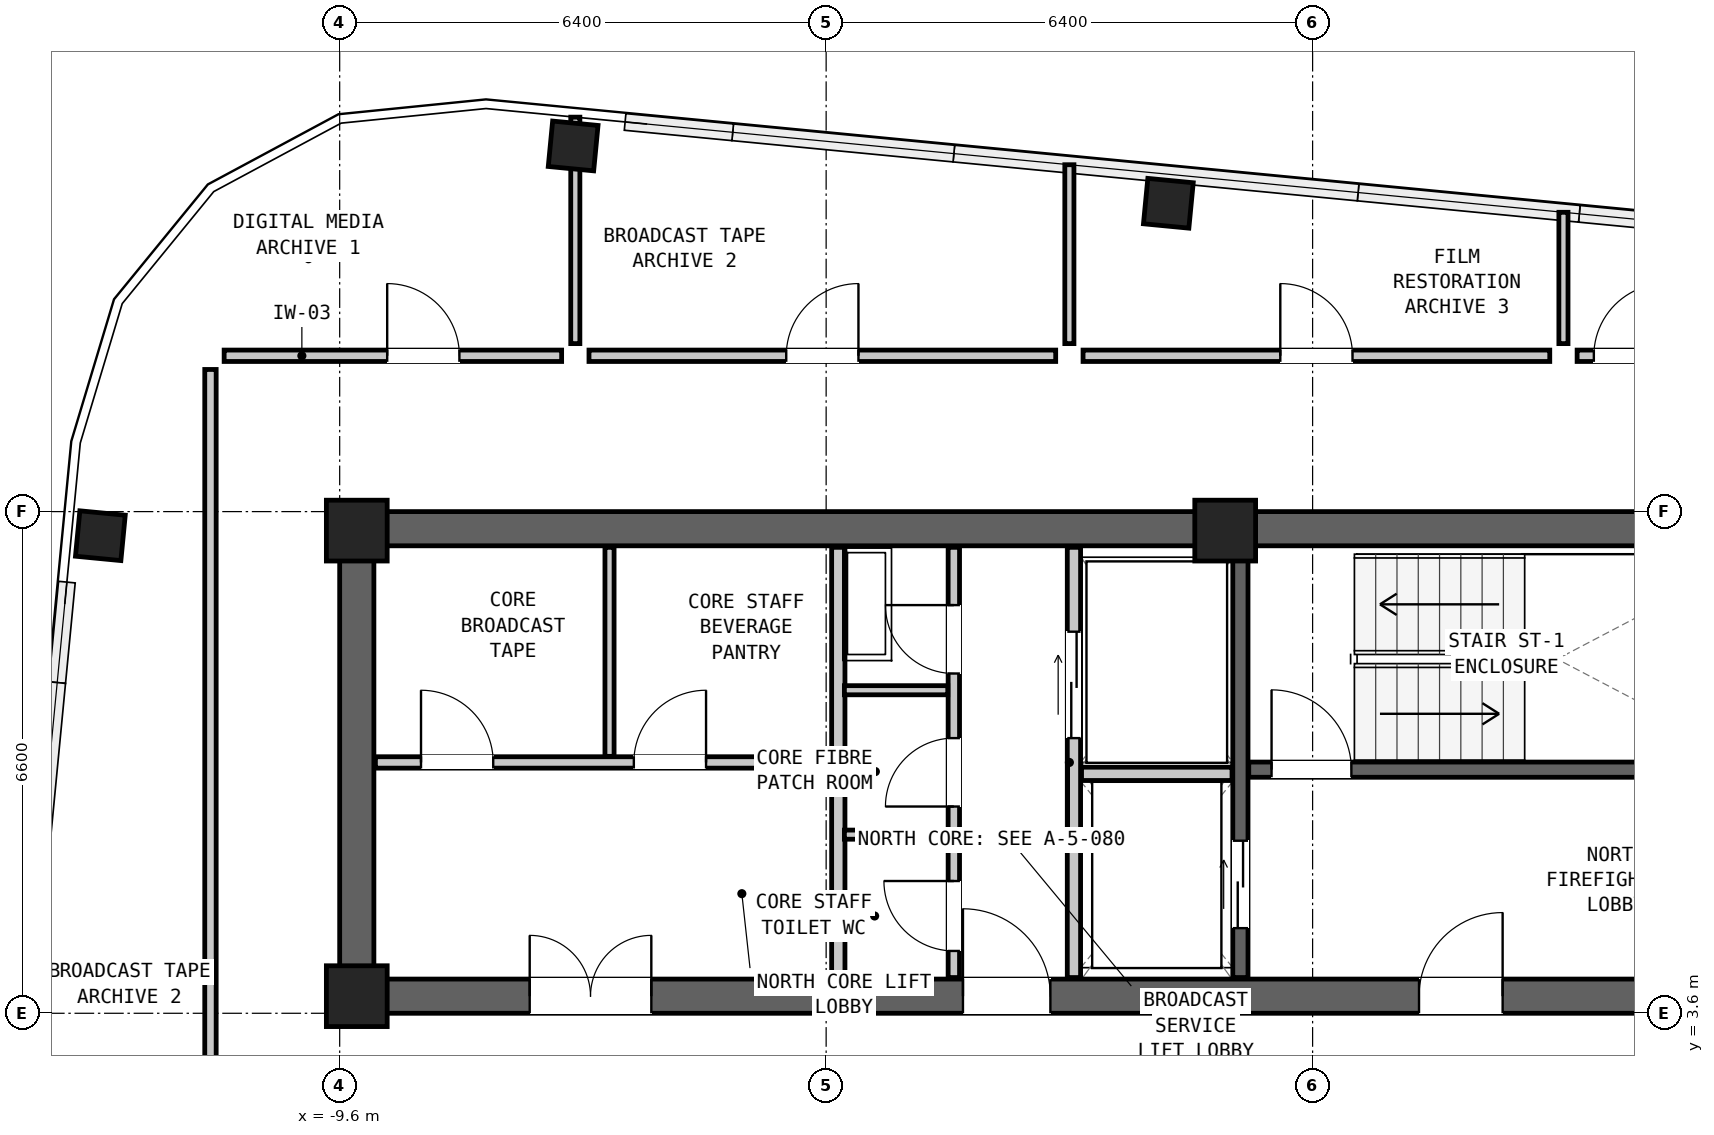
"""IFC4 building model, lengths in metres.
Left out: names, types, materials, properties, quantities, classifications, styles, units other than length and angle.
Written with IfcOpenShell. Run it as: python <this file> out.ifc"""

import sys

from ifc_helpers import new_model, si_unit, direction, frame, frame_2d, origin, origin_2d, place, context, subcontext, project, spatial, rectangle, hollow_rectangle, extrude, element, fill, save


model = new_model("IFC4")
c1 = context("Model", 3, precision=1e-05, world=origin(), true_north=direction((0.0, 1.0)))
c2 = subcontext(c1, "Body", "Model", "MODEL_VIEW")
j1 = project(units=[si_unit("LENGTHUNIT", "METRE"), si_unit("PLANEANGLEUNIT", "RADIAN")], contexts=[c1])
p1 = place(None, origin())
s1 = spatial("IfcSite", under=j1, at=p1, CompositionType="ELEMENT")
p2 = place(p1, origin())
s2 = spatial("IfcBuilding", under=s1, at=p2, CompositionType="ELEMENT")
p3 = place(p2, frame((0.0, 0.0, 261.15)))
s3 = spatial("IfcBuildingStorey", under=s2, at=p3, CompositionType="ELEMENT", Elevation=261.15)
p4 = place(p3, frame((-9.6, 9.975, 0.0), z_axis=(0.0, 0.0, 1.0), x_axis=(1.0, 0.0, 0.0)))
e1 = element("IfcWall", 1, at=p4, inside=s3, PredefinedType="SHEAR", context=c2, shape_type="SweptSolid", body=[
    extrude(rectangle(XDim=19.2, YDim=0.45, at=frame_2d((9.6, 0.0))), origin(), (0.0, 0.0, 1.0), 3.05),
])
p5 = place(p3, frame((-9.6, 3.825, 0.0), z_axis=(0.0, 0.0, 1.0), x_axis=(1.0, 0.0, 0.0)))
e2 = element("IfcWall", 2, at=p5, inside=s3, PredefinedType="SHEAR", context=c2, shape_type="SweptSolid", body=[
    extrude(rectangle(XDim=19.2, YDim=0.45, at=frame_2d((9.6, 0.0))), origin(), (0.0, 0.0, 1.0), 3.05),
])
p6 = place(p5, frame((14.2, 0.0, 0.0)))
e3 = element("IfcOpeningElement", 3, at=p6, cuts=e2, PredefinedType="OPENING", context=c2, shape_type="SweptSolid", body=[
    extrude(rectangle(XDim=1.1, YDim=2.08, at=frame_2d((0.55, 1.04))), frame((0.0, 0.237, 0.0), z_axis=(0.0, -1.0, 0.0), x_axis=(1.0, 0.0, 0.0)), (0.0, 0.0, 1.0), 0.474),
])
p7 = place(p5, frame((8.2, 0.0, 0.0)))
e4 = element("IfcOpeningElement", 4, at=p7, cuts=e2, PredefinedType="OPENING", context=c2, shape_type="SweptSolid", body=[
    extrude(rectangle(XDim=1.15, YDim=2.1, at=frame_2d((0.575, 1.05))), frame((0.0, 0.237, 0.0), z_axis=(0.0, -1.0, 0.0), x_axis=(1.0, 0.0, 0.0)), (0.0, 0.0, 1.0), 0.474),
])
p8 = place(p5, frame((2.5, 0.0, 0.0)))
e5 = element("IfcOpeningElement", 5, at=p8, cuts=e2, PredefinedType="OPENING", context=c2, shape_type="SweptSolid", body=[
    extrude(rectangle(XDim=1.6, YDim=2.12, at=frame_2d((0.8, 1.06))), frame((0.0, 0.237, 0.0), z_axis=(0.0, -1.0, 0.0), x_axis=(1.0, 0.0, 0.0)), (0.0, 0.0, 1.0), 0.474),
])
p9 = place(p3, frame((-9.375, 3.6, 0.0), z_axis=(0.0, 0.0, 1.0), x_axis=(0.0, 1.0, 0.0)))
e6 = element("IfcWall", 6, at=p9, inside=s3, PredefinedType="SHEAR", context=c2, shape_type="SweptSolid", body=[
    extrude(rectangle(XDim=6.6, YDim=0.45, at=frame_2d((3.3, 0.0))), origin(), (0.0, 0.0, 1.0), 3.05),
])
for number, where, z_axis, x_axis in (
    (7, (1.302, 14.256, 0.0), (0.0, 0.0, 1.0), (0.995, -0.096, 0.0)),
    (8, (-6.528, 15.01, 0.0), (0.0, 0.0, 1.0), (0.995, -0.096, 0.0)),
    (9, (-12.749, 9.883, 0.0), (0.0, 0.0, 1.0), (0.096, 0.995, 0.0)),
):
    element("IfcColumn", number, at=place(p3, frame(where, z_axis=z_axis, x_axis=x_axis)), inside=s3, PredefinedType="COLUMN", context=c2, shape_type="SweptSolid", body=[
        extrude(hollow_rectangle(XDim=0.6, YDim=0.6, WallThickness=0.04, at=origin_2d()), origin(), (0.0, 0.0, 1.0), 3.05),
    ])
for number, where, z_axis, x_axis in (
    (10, (-9.375, 9.95, 0.0), (0.0, 0.0, 1.0), (1.0, 0.0, 0.0)),
    (11, (2.05, 9.95, 0.0), (0.0, 0.0, 1.0), (1.0, 0.0, 0.0)),
    (12, (-9.375, 3.825, 0.0), (0.0, 0.0, 1.0), (1.0, 0.0, 0.0)),
):
    element("IfcColumn", number, at=place(p3, frame(where, z_axis=z_axis, x_axis=x_axis)), inside=s3, PredefinedType="COLUMN", context=c2, shape_type="SweptSolid", body=[
        extrude(rectangle(XDim=0.8, YDim=0.8, at=origin_2d()), origin(), (0.0, 0.0, 1.0), 3.05),
    ])
p10 = place(p3, frame((2.36, 6.805, 0.0), z_axis=(0.0, 0.0, 1.0), x_axis=(1.0, 0.0, 0.0)))
e13 = element("IfcWall", 13, at=p10, inside=s3, PredefinedType="SHEAR", context=c2, shape_type="SweptSolid", body=[
    extrude(rectangle(XDim=6.77, YDim=0.2, at=frame_2d((3.385, 0.0))), origin(), (0.0, 0.0, 1.0), 2.86),
])
p11 = place(p10, frame((0.3, 0.0, 0.0)))
e14 = element("IfcOpeningElement", 14, at=p11, cuts=e13, PredefinedType="OPENING", context=c2, shape_type="SweptSolid", body=[
    extrude(rectangle(XDim=1.05, YDim=2.08, at=frame_2d((0.525, 1.04))), frame((0.0, 0.112, 0.0), z_axis=(0.0, -1.0, 0.0), x_axis=(1.0, 0.0, 0.0)), (0.0, 0.0, 1.0), 0.224),
])
p12 = place(p3, frame((2.25, 4.07, 0.0), z_axis=(0.0, 0.0, 1.0), x_axis=(0.0, 1.0, 0.0)))
e15 = element("IfcWall", 15, at=p12, inside=s3, PredefinedType="SHEAR", context=c2, shape_type="SweptSolid", body=[
    extrude(rectangle(XDim=5.66, YDim=0.2, at=frame_2d((2.83, 0.0))), origin(), (0.0, 0.0, 1.0), 2.86),
])
p13 = place(p12, frame((0.65, 0.0, 0.0)))
e16 = element("IfcOpeningElement", 16, at=p13, cuts=e15, PredefinedType="OPENING", context=c2, shape_type="SweptSolid", body=[
    extrude(rectangle(XDim=1.15, YDim=2.08, at=frame_2d((0.575, 1.04))), frame((0.0, 0.112, 0.0), z_axis=(0.0, -1.0, 0.0), x_axis=(1.0, 0.0, 0.0)), (0.0, 0.0, 1.0), 0.224),
])
p14 = place(p3, frame((0.06, 4.07, 0.0), z_axis=(0.0, 0.0, 1.0), x_axis=(0.0, 1.0, 0.0)))
e17 = element("IfcWall", 17, at=p14, inside=s3, PredefinedType="PARTITIONING", context=c2, shape_type="SweptSolid", body=[
    extrude(rectangle(XDim=5.66, YDim=0.175, at=frame_2d((2.83, 0.0))), origin(), (0.0, 0.0, 1.0), 2.86),
])
p15 = place(p14, frame((3.15, 0.0, 0.0)))
e18 = element("IfcOpeningElement", 18, at=p15, cuts=e17, PredefinedType="OPENING", context=c2, shape_type="SweptSolid", body=[
    extrude(rectangle(XDim=1.4, YDim=2.12, at=frame_2d((0.7, 1.06))), frame((0.0, 0.1, 0.0), z_axis=(0.0, -1.0, 0.0), x_axis=(1.0, 0.0, 0.0)), (0.0, 0.0, 1.0), 0.199),
])
p16 = place(p3, frame((0.16, 6.75, 0.0), z_axis=(0.0, 0.0, 1.0), x_axis=(1.0, 0.0, 0.0)))
e19 = element("IfcWall", 19, at=p16, inside=s3, PredefinedType="PARTITIONING", context=c2, shape_type="SweptSolid", body=[
    extrude(rectangle(XDim=1.98, YDim=0.175, at=frame_2d((0.99, 0.0))), origin(), (0.0, 0.0, 1.0), 2.86),
])
p17 = place(p3, frame((-3.04, 4.07, 0.0), z_axis=(0.0, 0.0, 1.0), x_axis=(0.0, 1.0, 0.0)))
e20 = element("IfcWall", 20, at=p17, inside=s3, PredefinedType="PARTITIONING", context=c2, shape_type="SweptSolid", body=[
    extrude(rectangle(XDim=5.66, YDim=0.175, at=frame_2d((2.83, 0.0))), origin(), (0.0, 0.0, 1.0), 2.86),
])
p18 = place(p3, frame((-1.52, 4.07, 0.0), z_axis=(0.0, 0.0, 1.0), x_axis=(0.0, 1.0, 0.0)))
e21 = element("IfcWall", 21, at=p18, inside=s3, PredefinedType="PARTITIONING", context=c2, shape_type="SweptSolid", body=[
    extrude(rectangle(XDim=5.66, YDim=0.15, at=frame_2d((2.83, 0.0))), origin(), (0.0, 0.0, 1.0), 2.86),
])
p19 = place(p18, frame((4.0, 0.0, 0.0)))
e22 = element("IfcOpeningElement", 22, at=p19, cuts=e21, PredefinedType="OPENING", context=c2, shape_type="SweptSolid", body=[
    extrude(rectangle(XDim=0.9, YDim=2.05, at=frame_2d((0.45, 1.025))), frame((0.0, 0.087, 0.0), z_axis=(0.0, -1.0, 0.0), x_axis=(1.0, 0.0, 0.0)), (0.0, 0.0, 1.0), 0.174),
])
p20 = place(p18, frame((2.25, 0.0, 0.0)))
e23 = element("IfcOpeningElement", 23, at=p20, cuts=e21, PredefinedType="OPENING", context=c2, shape_type="SweptSolid", body=[
    extrude(rectangle(XDim=0.9, YDim=2.05, at=frame_2d((0.45, 1.025))), frame((0.0, 0.087, 0.0), z_axis=(0.0, -1.0, 0.0), x_axis=(1.0, 0.0, 0.0)), (0.0, 0.0, 1.0), 0.174),
])
p21 = place(p18, frame((0.35, 0.0, 0.0)))
e24 = element("IfcOpeningElement", 24, at=p21, cuts=e21, PredefinedType="OPENING", context=c2, shape_type="SweptSolid", body=[
    extrude(rectangle(XDim=0.92, YDim=2.1, at=frame_2d((0.46, 1.05))), frame((0.0, 0.087, 0.0), z_axis=(0.0, -1.0, 0.0), x_axis=(1.0, 0.0, 0.0)), (0.0, 0.0, 1.0), 0.174),
])
for number, where, z_axis, x_axis in (
    (25, (-2.96, 5.95, 0.0), (0.0, 0.0, 1.0), (1.0, 0.0, 0.0)),
    (26, (-2.96, 7.85, 0.0), (0.0, 0.0, 1.0), (1.0, 0.0, 0.0)),
):
    element("IfcWall", number, at=place(p3, frame(where, z_axis=z_axis, x_axis=x_axis)), inside=s3, PredefinedType="PARTITIONING", context=c2, shape_type="SweptSolid", body=[
        extrude(rectangle(XDim=1.36, YDim=0.12, at=frame_2d((0.68, 0.0))), origin(), (0.0, 0.0, 1.0), 2.86),
    ])
p22 = place(p3, frame((-9.13, 6.9, 0.0), z_axis=(0.0, 0.0, 1.0), x_axis=(1.0, 0.0, 0.0)))
e27 = element("IfcWall", 27, at=p22, inside=s3, PredefinedType="PARTITIONING", context=c2, shape_type="SweptSolid", body=[
    extrude(rectangle(XDim=6.01, YDim=0.15, at=frame_2d((3.005, 0.0))), origin(), (0.0, 0.0, 1.0), 2.86),
])
p23 = place(p22, frame((0.6, 0.0, 0.0)))
e28 = element("IfcOpeningElement", 28, at=p23, cuts=e27, PredefinedType="OPENING", context=c2, shape_type="SweptSolid", body=[
    extrude(rectangle(XDim=0.95, YDim=2.1, at=frame_2d((0.475, 1.05))), frame((0.0, 0.087, 0.0), z_axis=(0.0, -1.0, 0.0), x_axis=(1.0, 0.0, 0.0)), (0.0, 0.0, 1.0), 0.174),
])
p24 = place(p22, frame((3.4, 0.0, 0.0)))
e29 = element("IfcOpeningElement", 29, at=p24, cuts=e27, PredefinedType="OPENING", context=c2, shape_type="SweptSolid", body=[
    extrude(rectangle(XDim=0.95, YDim=2.1, at=frame_2d((0.475, 1.05))), frame((0.0, 0.087, 0.0), z_axis=(0.0, -1.0, 0.0), x_axis=(1.0, 0.0, 0.0)), (0.0, 0.0, 1.0), 0.174),
])
p25 = place(p3, frame((-6.05, 6.98, 0.0), z_axis=(0.0, 0.0, 1.0), x_axis=(0.0, 1.0, 0.0)))
e30 = element("IfcWall", 30, at=p25, inside=s3, PredefinedType="PARTITIONING", context=c2, shape_type="SweptSolid", body=[
    extrude(rectangle(XDim=2.75, YDim=0.12, at=frame_2d((1.375, 0.0))), origin(), (0.0, 0.0, 1.0), 2.86),
])
p26 = place(p3, frame((-6.5, 12.41, 0.0), z_axis=(0.0, 0.0, 1.0), x_axis=(0.0, 1.0, 0.0)))
e31 = element("IfcWall", 31, at=p26, inside=s3, PredefinedType="PARTITIONING", context=c2, shape_type="SweptSolid", body=[
    extrude(rectangle(XDim=2.979, YDim=0.12, at=frame_2d((1.49, 0.0))), origin(), (0.0, 0.0, 1.0), 2.381),
])
p27 = place(p3, frame((0.0, 12.41, 0.0), z_axis=(0.0, 0.0, 1.0), x_axis=(0.0, 1.0, 0.0)))
e32 = element("IfcWall", 32, at=p27, inside=s3, PredefinedType="PARTITIONING", context=c2, shape_type="SweptSolid", body=[
    extrude(rectangle(XDim=2.354, YDim=0.12, at=frame_2d((1.177, 0.0))), origin(), (0.0, 0.0, 1.0), 2.381),
])
p28 = place(p3, frame((6.5, 12.41, 0.0), z_axis=(0.0, 0.0, 1.0), x_axis=(0.0, 1.0, 0.0)))
e33 = element("IfcWall", 33, at=p28, inside=s3, PredefinedType="PARTITIONING", context=c2, shape_type="SweptSolid", body=[
    extrude(rectangle(XDim=1.728, YDim=0.12, at=frame_2d((0.864, 0.0))), origin(), (0.0, 0.0, 1.0), 2.381),
])
p29 = place(p3, frame((-11.12, 12.25, 0.0), z_axis=(0.0, 0.0, 1.0), x_axis=(1.0, 0.0, 0.0)))
e34 = element("IfcWall", 34, at=p29, inside=s3, PredefinedType="PARTITIONING", context=c2, shape_type="SweptSolid", body=[
    extrude(rectangle(XDim=4.44, YDim=0.15, at=frame_2d((2.22, 0.0))), origin(), (0.0, 0.0, 1.0), 2.86),
])
p30 = place(p29, frame((2.145, 0.0, 0.0)))
e35 = element("IfcOpeningElement", 35, at=p30, cuts=e34, PredefinedType="OPENING", context=c2, shape_type="SweptSolid", body=[
    extrude(rectangle(XDim=0.95, YDim=2.1, at=frame_2d((0.475, 1.05))), frame((0.0, 0.087, 0.0), z_axis=(0.0, -1.0, 0.0), x_axis=(1.0, 0.0, 0.0)), (0.0, 0.0, 1.0), 0.174),
])
p31 = place(p3, frame((-6.32, 12.25, 0.0), z_axis=(0.0, 0.0, 1.0), x_axis=(1.0, 0.0, 0.0)))
e36 = element("IfcWall", 36, at=p31, inside=s3, PredefinedType="PARTITIONING", context=c2, shape_type="SweptSolid", body=[
    extrude(rectangle(XDim=6.14, YDim=0.15, at=frame_2d((3.07, 0.0))), origin(), (0.0, 0.0, 1.0), 2.86),
])
p32 = place(p31, frame((2.595, 0.0, 0.0)))
e37 = element("IfcOpeningElement", 37, at=p32, cuts=e36, PredefinedType="OPENING", context=c2, shape_type="SweptSolid", body=[
    extrude(rectangle(XDim=0.95, YDim=2.1, at=frame_2d((0.475, 1.05))), frame((0.0, 0.087, 0.0), z_axis=(0.0, -1.0, 0.0), x_axis=(1.0, 0.0, 0.0)), (0.0, 0.0, 1.0), 0.174),
])
p33 = place(p3, frame((0.18, 12.25, 0.0), z_axis=(0.0, 0.0, 1.0), x_axis=(1.0, 0.0, 0.0)))
e38 = element("IfcWall", 38, at=p33, inside=s3, PredefinedType="PARTITIONING", context=c2, shape_type="SweptSolid", body=[
    extrude(rectangle(XDim=6.14, YDim=0.15, at=frame_2d((3.07, 0.0))), origin(), (0.0, 0.0, 1.0), 2.86),
])
p34 = place(p33, frame((2.595, 0.0, 0.0)))
e39 = element("IfcOpeningElement", 39, at=p34, cuts=e38, PredefinedType="OPENING", context=c2, shape_type="SweptSolid", body=[
    extrude(rectangle(XDim=0.95, YDim=2.1, at=frame_2d((0.475, 1.05))), frame((0.0, 0.087, 0.0), z_axis=(0.0, -1.0, 0.0), x_axis=(1.0, 0.0, 0.0)), (0.0, 0.0, 1.0), 0.174),
])
p35 = place(p3, frame((6.68, 12.25, 0.0), z_axis=(0.0, 0.0, 1.0), x_axis=(1.0, 0.0, 0.0)))
e40 = element("IfcWall", 40, at=p35, inside=s3, PredefinedType="PARTITIONING", context=c2, shape_type="SweptSolid", body=[
    extrude(rectangle(XDim=4.79, YDim=0.15, at=frame_2d((2.395, 0.0))), origin(), (0.0, 0.0, 1.0), 2.86),
])
p36 = place(p35, frame((0.22, 0.0, 0.0)))
e41 = element("IfcOpeningElement", 41, at=p36, cuts=e40, PredefinedType="OPENING", context=c2, shape_type="SweptSolid", body=[
    extrude(rectangle(XDim=0.95, YDim=2.1, at=frame_2d((0.475, 1.05))), frame((0.0, 0.087, 0.0), z_axis=(0.0, -1.0, 0.0), x_axis=(1.0, 0.0, 0.0)), (0.0, 0.0, 1.0), 0.174),
])
p37 = place(p3, frame((-11.3, 12.07, 0.0), z_axis=(0.0, 0.0, 1.0), x_axis=(0.0, -1.0, 0.0)))
e42 = element("IfcWall", 42, at=p37, inside=s3, PredefinedType="PARTITIONING", context=c2, shape_type="SweptSolid", body=[
    extrude(rectangle(XDim=11.09, YDim=0.15, at=frame_2d((5.545, 0.0))), origin(), (0.0, 0.0, 1.0), 2.86),
])
p38 = place(p37, frame((9.062, 0.0, 0.0)))
e43 = element("IfcOpeningElement", 43, at=p38, cuts=e42, PredefinedType="OPENING", context=c2, shape_type="SweptSolid", body=[
    extrude(rectangle(XDim=0.95, YDim=2.1, at=frame_2d((0.475, 1.05))), frame((0.0, 0.087, 0.0), z_axis=(0.0, -1.0, 0.0), x_axis=(1.0, 0.0, 0.0)), (0.0, 0.0, 1.0), 0.174),
])
p39 = place(p11, origin())
e44 = element("IfcDoor", 44, at=p39, inside=s3, OperationType="SINGLE_SWING_LEFT", PredefinedType="DOOR", context=c2, shape_type="SweptSolid", body=[
    extrude(rectangle(XDim=1.05, YDim=2.08, at=frame_2d((0.525, 1.04))), frame((0.0, 0.025, 0.0), z_axis=(0.0, -1.0, 0.0), x_axis=(1.0, 0.0, 0.0)), (0.0, 0.0, 1.0), 0.05),
])
fill(e14, e44)
p40 = place(p6, origin())
e45 = element("IfcDoor", 45, at=p40, inside=s3, OperationType="SINGLE_SWING_RIGHT", PredefinedType="DOOR", context=c2, shape_type="SweptSolid", body=[
    extrude(rectangle(XDim=1.1, YDim=2.08, at=frame_2d((0.55, 1.04))), frame((0.0, 0.025, 0.0), z_axis=(0.0, -1.0, 0.0), x_axis=(1.0, 0.0, 0.0)), (0.0, 0.0, 1.0), 0.05),
])
fill(e3, e45)
p41 = place(p13, origin())
e46 = element("IfcDoor", 46, at=p41, inside=s3, OperationType="DOUBLE_DOOR_SLIDING", PredefinedType="DOOR", context=c2, shape_type="SweptSolid", body=[
    extrude(rectangle(XDim=1.15, YDim=2.08, at=frame_2d((0.575, 1.04))), frame((0.0, 0.025, 0.0), z_axis=(0.0, -1.0, 0.0), x_axis=(1.0, 0.0, 0.0)), (0.0, 0.0, 1.0), 0.05),
])
fill(e16, e46)
p42 = place(p15, origin())
e47 = element("IfcDoor", 47, at=p42, inside=s3, OperationType="DOUBLE_DOOR_SLIDING", PredefinedType="DOOR", context=c2, shape_type="SweptSolid", body=[
    extrude(rectangle(XDim=1.4, YDim=2.12, at=frame_2d((0.7, 1.06))), frame((0.0, 0.025, 0.0), z_axis=(0.0, -1.0, 0.0), x_axis=(1.0, 0.0, 0.0)), (0.0, 0.0, 1.0), 0.05),
])
fill(e18, e47)
p43 = place(p7, origin())
e48 = element("IfcDoor", 48, at=p43, inside=s3, OperationType="SINGLE_SWING_LEFT", PredefinedType="DOOR", context=c2, shape_type="SweptSolid", body=[
    extrude(rectangle(XDim=1.15, YDim=2.1, at=frame_2d((0.575, 1.05))), frame((0.0, 0.025, 0.0), z_axis=(0.0, -1.0, 0.0), x_axis=(1.0, 0.0, 0.0)), (0.0, 0.0, 1.0), 0.05),
])
fill(e4, e48)
p44 = place(p19, origin())
e49 = element("IfcDoor", 49, at=p44, inside=s3, OperationType="SINGLE_SWING_RIGHT", PredefinedType="DOOR", context=c2, shape_type="SweptSolid", body=[
    extrude(rectangle(XDim=0.9, YDim=2.05, at=frame_2d((0.45, 1.025))), frame((0.0, 0.025, 0.0), z_axis=(0.0, -1.0, 0.0), x_axis=(1.0, 0.0, 0.0)), (0.0, 0.0, 1.0), 0.05),
])
fill(e22, e49)
p45 = place(p20, origin())
e50 = element("IfcDoor", 50, at=p45, inside=s3, OperationType="SINGLE_SWING_LEFT", PredefinedType="DOOR", context=c2, shape_type="SweptSolid", body=[
    extrude(rectangle(XDim=0.9, YDim=2.05, at=frame_2d((0.45, 1.025))), frame((0.0, 0.025, 0.0), z_axis=(0.0, -1.0, 0.0), x_axis=(1.0, 0.0, 0.0)), (0.0, 0.0, 1.0), 0.05),
])
fill(e23, e50)
p46 = place(p21, origin())
e51 = element("IfcDoor", 51, at=p46, inside=s3, OperationType="SINGLE_SWING_RIGHT", PredefinedType="DOOR", context=c2, shape_type="SweptSolid", body=[
    extrude(rectangle(XDim=0.92, YDim=2.1, at=frame_2d((0.46, 1.05))), frame((0.0, 0.025, 0.0), z_axis=(0.0, -1.0, 0.0), x_axis=(1.0, 0.0, 0.0)), (0.0, 0.0, 1.0), 0.05),
])
fill(e24, e51)
p47 = place(p8, origin())
e52 = element("IfcDoor", 52, at=p47, inside=s3, OperationType="DOUBLE_DOOR_SINGLE_SWING", PredefinedType="DOOR", context=c2, shape_type="SweptSolid", body=[
    extrude(rectangle(XDim=1.6, YDim=2.12, at=frame_2d((0.8, 1.06))), frame((0.0, 0.025, 0.0), z_axis=(0.0, -1.0, 0.0), x_axis=(1.0, 0.0, 0.0)), (0.0, 0.0, 1.0), 0.05),
])
fill(e5, e52)
p48 = place(p23, origin())
e53 = element("IfcDoor", 53, at=p48, inside=s3, OperationType="SINGLE_SWING_LEFT", PredefinedType="DOOR", context=c2, shape_type="SweptSolid", body=[
    extrude(rectangle(XDim=0.95, YDim=2.1, at=frame_2d((0.475, 1.05))), frame((0.0, 0.025, 0.0), z_axis=(0.0, -1.0, 0.0), x_axis=(1.0, 0.0, 0.0)), (0.0, 0.0, 1.0), 0.05),
])
fill(e28, e53)
p49 = place(p24, origin())
e54 = element("IfcDoor", 54, at=p49, inside=s3, OperationType="SINGLE_SWING_RIGHT", PredefinedType="DOOR", context=c2, shape_type="SweptSolid", body=[
    extrude(rectangle(XDim=0.95, YDim=2.1, at=frame_2d((0.475, 1.05))), frame((0.0, 0.025, 0.0), z_axis=(0.0, -1.0, 0.0), x_axis=(1.0, 0.0, 0.0)), (0.0, 0.0, 1.0), 0.05),
])
fill(e29, e54)
p50 = place(p30, origin())
e55 = element("IfcDoor", 55, at=p50, inside=s3, OperationType="SINGLE_SWING_LEFT", PredefinedType="DOOR", context=c2, shape_type="SweptSolid", body=[
    extrude(rectangle(XDim=0.95, YDim=2.1, at=frame_2d((0.475, 1.05))), frame((0.0, 0.025, 0.0), z_axis=(0.0, -1.0, 0.0), x_axis=(1.0, 0.0, 0.0)), (0.0, 0.0, 1.0), 0.05),
])
fill(e35, e55)
p51 = place(p32, origin())
e56 = element("IfcDoor", 56, at=p51, inside=s3, OperationType="SINGLE_SWING_RIGHT", PredefinedType="DOOR", context=c2, shape_type="SweptSolid", body=[
    extrude(rectangle(XDim=0.95, YDim=2.1, at=frame_2d((0.475, 1.05))), frame((0.0, 0.025, 0.0), z_axis=(0.0, -1.0, 0.0), x_axis=(1.0, 0.0, 0.0)), (0.0, 0.0, 1.0), 0.05),
])
fill(e37, e56)
p52 = place(p34, origin())
e57 = element("IfcDoor", 57, at=p52, inside=s3, OperationType="SINGLE_SWING_LEFT", PredefinedType="DOOR", context=c2, shape_type="SweptSolid", body=[
    extrude(rectangle(XDim=0.95, YDim=2.1, at=frame_2d((0.475, 1.05))), frame((0.0, 0.025, 0.0), z_axis=(0.0, -1.0, 0.0), x_axis=(1.0, 0.0, 0.0)), (0.0, 0.0, 1.0), 0.05),
])
fill(e39, e57)
p53 = place(p36, origin())
e58 = element("IfcDoor", 58, at=p53, inside=s3, OperationType="SINGLE_SWING_RIGHT", PredefinedType="DOOR", context=c2, shape_type="SweptSolid", body=[
    extrude(rectangle(XDim=0.95, YDim=2.1, at=frame_2d((0.475, 1.05))), frame((0.0, 0.025, 0.0), z_axis=(0.0, -1.0, 0.0), x_axis=(1.0, 0.0, 0.0)), (0.0, 0.0, 1.0), 0.05),
])
fill(e41, e58)
save(model, sys.argv[1])
